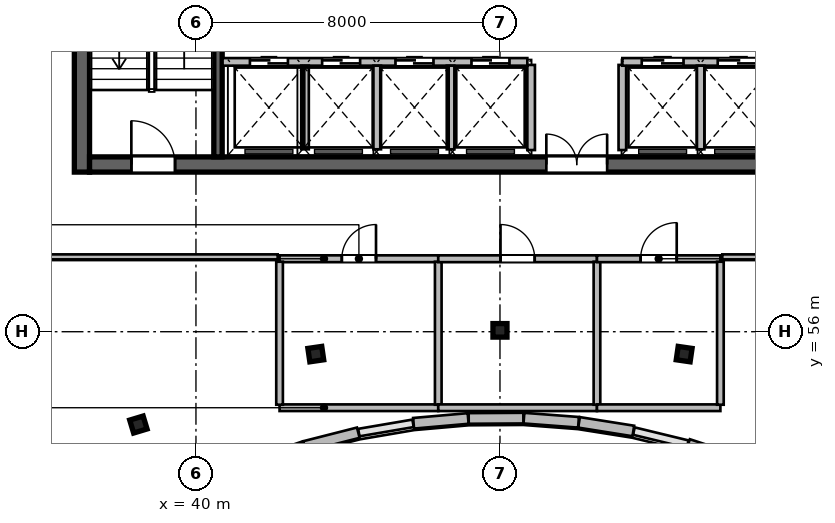
"""IFC4 building model, lengths in metres.
Left out: names, types, materials, properties, quantities, classifications, styles, units other than length and angle.
Written with IfcOpenShell. Run it as: python <this file> out.ifc"""

import sys

from ifc_helpers import new_model, si_unit, direction, frame, frame_2d, origin, origin_2d, place, context, subcontext, project, spatial, rectangle, i_section, extrude, source, transform, mapped, element, fill, save


model = new_model("IFC4")
c1 = context("Model", 3, precision=1e-05, world=origin(), true_north=direction((0.0, 1.0)))
c2 = subcontext(c1, "Body", "Model", "MODEL_VIEW")
j1 = project(units=[si_unit("LENGTHUNIT", "METRE"), si_unit("PLANEANGLEUNIT", "RADIAN")], contexts=[c1])
p1 = place(None, origin())
s1 = spatial("IfcSite", under=j1, at=p1, CompositionType="ELEMENT")
p2 = place(p1, origin())
s2 = spatial("IfcBuilding", under=s1, at=p2, CompositionType="ELEMENT")
p3 = place(p2, frame((0.0, 0.0, 303.0)))
s3 = spatial("IfcBuildingStorey", under=s2, at=p3, CompositionType="ELEMENT", Elevation=303.0)
m1 = source(origin(), c2, "Body", "SweptSolid", [
    extrude(rectangle(XDim=12.0, YDim=0.4, at=frame_2d((6.0, 0.0))), origin(), (0.0, 0.0, 1.0), 4.8),
])
p4 = place(p3, frame((37.0, 60.2, 0.0), z_axis=(0.0, 0.0, 1.0), x_axis=(0.0, 1.0, 0.0)))
e1 = element("IfcWall", 1, at=p4, inside=s3, PredefinedType="SHEAR", context=c2, shape_type="MappedRepresentation", body=[
    mapped(m1, transform((0.0, 0.0, 0.0), scale=1.0)),
])
m2 = source(origin(), c2, "Body", "SweptSolid", [
    extrude(rectangle(XDim=21.6, YDim=0.4, at=frame_2d((10.8, 0.0))), origin(), (0.0, 0.0, 1.0), 4.8),
])
p5 = place(p3, frame((37.2, 60.4, 0.0), z_axis=(0.0, 0.0, 1.0), x_axis=(1.0, 0.0, 0.0)))
e2 = element("IfcWall", 2, at=p5, inside=s3, PredefinedType="SHEAR", context=c2, shape_type="MappedRepresentation", body=[
    mapped(m2, transform((0.0, 0.0, 0.0), scale=1.0)),
])
p6 = place(p5, frame((1.1, 0.0, 0.0)))
e3 = element("IfcOpeningElement", 3, at=p6, cuts=e2, PredefinedType="OPENING", context=c2, shape_type="SweptSolid", body=[
    extrude(rectangle(XDim=1.15, YDim=2.15, at=frame_2d((0.575, 1.075))), frame((0.0, 0.21, 0.0), z_axis=(0.0, -1.0, 0.0), x_axis=(1.0, 0.0, 0.0)), (0.0, 0.0, 1.0), 0.42),
])
p7 = place(p5, frame((19.5, 0.0, 0.0)))
e4 = element("IfcOpeningElement", 4, at=p7, cuts=e2, PredefinedType="OPENING", context=c2, shape_type="SweptSolid", body=[
    extrude(rectangle(XDim=0.9, YDim=2.1, at=frame_2d((0.45, 1.05))), frame((0.0, 0.21, 0.0), z_axis=(0.0, -1.0, 0.0), x_axis=(1.0, 0.0, 0.0)), (0.0, 0.0, 1.0), 0.42),
])
p8 = place(p5, frame((12.02, 0.0, 0.0)))
e5 = element("IfcOpeningElement", 5, at=p8, cuts=e2, PredefinedType="OPENING", context=c2, shape_type="SweptSolid", body=[
    extrude(rectangle(XDim=1.6, YDim=2.15, at=frame_2d((0.8, 1.075))), frame((0.0, 0.21, 0.0), z_axis=(0.0, -1.0, 0.0), x_axis=(1.0, 0.0, 0.0)), (0.0, 0.0, 1.0), 0.42),
])
m3 = source(origin(), c2, "Body", "SweptSolid", [
    extrude(rectangle(XDim=11.2, YDim=0.22, at=frame_2d((5.6, 0.0))), origin(), (0.0, 0.0, 1.0), 4.8),
])
p9 = place(p3, frame((40.58, 60.6, 0.0), z_axis=(0.0, 0.0, 1.0), x_axis=(0.0, 1.0, 0.0)))
e6 = element("IfcWall", 6, at=p9, inside=s3, PredefinedType="SHEAR", context=c2, shape_type="MappedRepresentation", body=[
    mapped(m3, transform((0.0, 0.0, 0.0), scale=1.0)),
])
m4 = source(origin(), c2, "Body", "SweptSolid", [
    extrude(i_section(OverallWidth=0.369, OverallDepth=0.356, WebThickness=0.011, FlangeThickness=0.018, at=origin_2d()), origin(), (0.0, 0.0, 1.0), 4.8),
])
for number, where, z_axis, x_axis in (
    (7, (38.485, 53.558, 0.0), (0.0, 0.0, 1.0), (-0.289, 0.957, 0.0)),
    (8, (43.154, 55.411, 0.0), (0.0, 0.0, 1.0), (-0.143, 0.99, 0.0)),
    (9, (48.0, 56.036, 0.0), (0.0, 0.0, 1.0), (0.0, 1.0, 0.0)),
    (10, (52.846, 55.411, 0.0), (0.0, 0.0, 1.0), (0.143, 0.99, 0.0)),
):
    element("IfcColumn", number, at=place(p3, frame(where, z_axis=z_axis, x_axis=x_axis)), inside=s3, PredefinedType="COLUMN", context=c2, shape_type="MappedRepresentation", body=[
        mapped(m4, transform((0.0, 0.0, 0.0), scale=1.0)),
    ])
m5 = source(origin(), c2, "Body", "SweptSolid", [
    extrude(rectangle(XDim=1.47, YDim=0.28, at=frame_2d((0.735, 0.0))), origin(), (0.0, 0.0, 1.0), 4.54),
])
p10 = place(p3, frame((54.35, 52.58, 0.0), z_axis=(0.0, 0.0, 1.0), x_axis=(-0.950248878954, 0.311491682145, 0.0)))
e11 = element("IfcWall", 11, at=p10, inside=s3, PredefinedType="SOLIDWALL", context=c2, shape_type="MappedRepresentation", body=[
    mapped(m5, transform((0.0, 0.0, 0.0), scale=1.0)),
])
m6 = source(origin(), c2, "Body", "SweptSolid", [
    extrude(rectangle(XDim=1.446, YDim=0.28, at=frame_2d((0.723, 0.0))), origin(), (0.0, 0.0, 1.0), 4.54),
])
p11 = place(p3, frame((51.509, 53.388, 0.0), z_axis=(0.0, 0.0, 1.0), x_axis=(-0.987650460941, 0.156673440642, 0.0)))
e12 = element("IfcWall", 12, at=p11, inside=s3, PredefinedType="SOLIDWALL", context=c2, shape_type="MappedRepresentation", body=[
    mapped(m6, transform((0.0, 0.0, 0.0), scale=1.0)),
])
m7 = source(origin(), c2, "Body", "SweptSolid", [
    extrude(rectangle(XDim=1.44, YDim=0.28, at=frame_2d((0.72, 0.0))), origin(), (0.0, 0.0, 1.0), 4.54),
])
p12 = place(p3, frame((50.066, 53.616, 0.0), z_axis=(0.0, 0.0, 1.0), x_axis=(-0.997124860794, 0.075776064736, 0.0)))
e13 = element("IfcWall", 13, at=p12, inside=s3, PredefinedType="SOLIDWALL", context=c2, shape_type="MappedRepresentation", body=[
    mapped(m7, transform((0.0, 0.0, 0.0), scale=1.0)),
])
m8 = source(origin(), c2, "Body", "SweptSolid", [
    extrude(rectangle(XDim=1.438, YDim=0.28, at=frame_2d((0.719, 0.0))), origin(), (0.0, 0.0, 1.0), 4.54),
])
p13 = place(p3, frame((48.615, 53.726, 0.0), z_axis=(0.0, 0.0, 1.0), x_axis=(-0.999982357135, -0.005940153174, 0.0)))
e14 = element("IfcWall", 14, at=p13, inside=s3, PredefinedType="SOLIDWALL", context=c2, shape_type="MappedRepresentation", body=[
    mapped(m8, transform((0.0, 0.0, 0.0), scale=1.0)),
])
m9 = source(origin(), c2, "Body", "SweptSolid", [
    extrude(rectangle(XDim=1.441, YDim=0.28, at=frame_2d((0.72, 0.0))), origin(), (0.0, 0.0, 1.0), 4.54),
])
p14 = place(p3, frame((47.162, 53.717, 0.0), z_axis=(0.0, 0.0, 1.0), x_axis=(-0.99617032352, -0.087433898101, 0.0)))
e15 = element("IfcWall", 15, at=p14, inside=s3, PredefinedType="SOLIDWALL", context=c2, shape_type="MappedRepresentation", body=[
    mapped(m9, transform((0.0, 0.0, 0.0), scale=1.0)),
])
m10 = source(origin(), c2, "Body", "SweptSolid", [
    extrude(rectangle(XDim=1.458, YDim=0.28, at=frame_2d((0.729, 0.0))), origin(), (0.0, 0.0, 1.0), 4.54),
])
p15 = place(p3, frame((44.271, 53.343, 0.0), z_axis=(0.0, 0.0, 1.0), x_axis=(-0.969109544438, -0.246630677083, 0.0)))
e16 = element("IfcWall", 16, at=p15, inside=s3, PredefinedType="SOLIDWALL", context=c2, shape_type="MappedRepresentation", body=[
    mapped(m10, transform((0.0, 0.0, 0.0), scale=1.0)),
])
m11 = source(origin(), c2, "Body", "SweptSolid", [
    extrude(rectangle(XDim=1.473, YDim=0.28, at=frame_2d((0.736, 0.0))), origin(), (0.0, 0.0, 1.0), 4.54),
])
p16 = place(p3, frame((42.845, 52.979, 0.0), z_axis=(0.0, 0.0, 1.0), x_axis=(-0.946641296917, -0.322289086026, 0.0)))
e17 = element("IfcWall", 17, at=p16, inside=s3, PredefinedType="SOLIDWALL", context=c2, shape_type="MappedRepresentation", body=[
    mapped(m11, transform((0.0, 0.0, 0.0), scale=1.0)),
])
m12 = source(origin(), c2, "Body", "SweptSolid", [
    extrude(rectangle(XDim=2.24, YDim=0.2, at=frame_2d((1.12, 0.0))), origin(), (0.0, 0.0, 1.0), 4.54),
])
for number, where, z_axis, x_axis in (
    (18, (48.82, 60.78, 0.0), (0.0, 0.0, 1.0), (0.0, 1.0, 0.0)),
    (19, (51.22, 60.78, 0.0), (0.0, 0.0, 1.0), (0.0, 1.0, 0.0)),
):
    element("IfcWall", number, at=place(p3, frame(where, z_axis=z_axis, x_axis=x_axis)), inside=s3, PredefinedType="SOLIDWALL", context=c2, shape_type="MappedRepresentation", body=[
        mapped(m12, transform((0.0, 0.0, 0.0), scale=1.0)),
    ])
m13 = source(origin(), c2, "Body", "SweptSolid", [
    extrude(rectangle(XDim=8.02, YDim=0.2, at=frame_2d((4.01, 0.0))), origin(), (0.0, 0.0, 1.0), 4.54),
])
p17 = place(p3, frame((40.7, 63.1, 0.0), z_axis=(0.0, 0.0, 1.0), x_axis=(1.0, 0.0, 0.0)))
e20 = element("IfcWall", 20, at=p17, inside=s3, PredefinedType="SOLIDWALL", context=c2, shape_type="MappedRepresentation", body=[
    mapped(m13, transform((0.0, 0.0, 0.0), scale=1.0)),
])
p18 = place(p17, frame((0.72, 0.0, 0.0)))
e21 = element("IfcOpeningElement", 21, at=p18, cuts=e20, PredefinedType="OPENING", context=c2, shape_type="SweptSolid", body=[
    extrude(rectangle(XDim=1.0, YDim=2.15, at=frame_2d((0.5, 1.075))), frame((0.0, 0.11, 0.0), z_axis=(0.0, -1.0, 0.0), x_axis=(1.0, 0.0, 0.0)), (0.0, 0.0, 1.0), 0.22),
])
p19 = place(p17, frame((2.62, 0.0, 0.0)))
e22 = element("IfcOpeningElement", 22, at=p19, cuts=e20, PredefinedType="OPENING", context=c2, shape_type="SweptSolid", body=[
    extrude(rectangle(XDim=1.0, YDim=2.15, at=frame_2d((0.5, 1.075))), frame((0.0, 0.11, 0.0), z_axis=(0.0, -1.0, 0.0), x_axis=(1.0, 0.0, 0.0)), (0.0, 0.0, 1.0), 0.22),
])
p20 = place(p17, frame((4.55, 0.0, 0.0)))
e23 = element("IfcOpeningElement", 23, at=p20, cuts=e20, PredefinedType="OPENING", context=c2, shape_type="SweptSolid", body=[
    extrude(rectangle(XDim=1.0, YDim=2.15, at=frame_2d((0.5, 1.075))), frame((0.0, 0.11, 0.0), z_axis=(0.0, -1.0, 0.0), x_axis=(1.0, 0.0, 0.0)), (0.0, 0.0, 1.0), 0.22),
])
p21 = place(p17, frame((6.55, 0.0, 0.0)))
e24 = element("IfcOpeningElement", 24, at=p21, cuts=e20, PredefinedType="OPENING", context=c2, shape_type="SweptSolid", body=[
    extrude(rectangle(XDim=1.0, YDim=2.15, at=frame_2d((0.5, 1.075))), frame((0.0, 0.11, 0.0), z_axis=(0.0, -1.0, 0.0), x_axis=(1.0, 0.0, 0.0)), (0.0, 0.0, 1.0), 0.22),
])
m14 = source(origin(), c2, "Body", "SweptSolid", [
    extrude(rectangle(XDim=4.1, YDim=0.2, at=frame_2d((2.05, 0.0))), origin(), (0.0, 0.0, 1.0), 4.54),
])
p22 = place(p3, frame((51.22, 63.1, 0.0), z_axis=(0.0, 0.0, 1.0), x_axis=(1.0, 0.0, 0.0)))
e25 = element("IfcWall", 25, at=p22, inside=s3, PredefinedType="SOLIDWALL", context=c2, shape_type="MappedRepresentation", body=[
    mapped(m14, transform((0.0, 0.0, 0.0), scale=1.0)),
])
p23 = place(p22, frame((0.51, 0.0, 0.0)))
e26 = element("IfcOpeningElement", 26, at=p23, cuts=e25, PredefinedType="OPENING", context=c2, shape_type="SweptSolid", body=[
    extrude(rectangle(XDim=1.1, YDim=2.15, at=frame_2d((0.55, 1.075))), frame((0.0, 0.11, 0.0), z_axis=(0.0, -1.0, 0.0), x_axis=(1.0, 0.0, 0.0)), (0.0, 0.0, 1.0), 0.22),
])
p24 = place(p22, frame((2.51, 0.0, 0.0)))
e27 = element("IfcOpeningElement", 27, at=p24, cuts=e25, PredefinedType="OPENING", context=c2, shape_type="SweptSolid", body=[
    extrude(rectangle(XDim=1.1, YDim=2.15, at=frame_2d((0.55, 1.075))), frame((0.0, 0.11, 0.0), z_axis=(0.0, -1.0, 0.0), x_axis=(1.0, 0.0, 0.0)), (0.0, 0.0, 1.0), 0.22),
])
m15 = source(origin(), c2, "Body", "SweptSolid", [
    extrude(rectangle(XDim=2.2, YDim=0.2, at=frame_2d((1.1, 0.0))), origin(), (0.0, 0.0, 1.0), 4.54),
])
for number, where, z_axis, x_axis in (
    (28, (42.87, 60.8, 0.0), (0.0, 0.0, 1.0), (0.0, 1.0, 0.0)),
    (29, (44.77, 60.8, 0.0), (0.0, 0.0, 1.0), (0.0, 1.0, 0.0)),
    (30, (46.7, 60.8, 0.0), (0.0, 0.0, 1.0), (0.0, 1.0, 0.0)),
    (31, (53.28, 60.8, 0.0), (0.0, 0.0, 1.0), (0.0, 1.0, 0.0)),
):
    element("IfcWall", number, at=place(p3, frame(where, z_axis=z_axis, x_axis=x_axis)), inside=s3, PredefinedType="SOLIDWALL", context=c2, shape_type="MappedRepresentation", body=[
        mapped(m15, transform((0.0, 0.0, 0.0), scale=1.0)),
    ])
m16 = source(origin(), c2, "Body", "SweptSolid", [
    extrude(rectangle(XDim=4.176, YDim=0.175, at=frame_2d((2.088, 0.0))), origin(), (0.0, 0.0, 1.0), 4.54),
])
p25 = place(p3, frame((42.2, 54.0, 0.0), z_axis=(0.0, 0.0, 1.0), x_axis=(1.0, 0.0, 0.0)))
e32 = element("IfcWall", 32, at=p25, inside=s3, PredefinedType="PARTITIONING", context=c2, shape_type="MappedRepresentation", body=[
    mapped(m16, transform((0.0, 0.0, 0.0), scale=1.0)),
])
m17 = source(origin(), c2, "Body", "SweptSolid", [
    extrude(rectangle(XDim=4.176, YDim=0.18, at=frame_2d((2.088, 0.0))), origin(), (0.0, 0.0, 1.0), 4.54),
])
p26 = place(p3, frame((42.2, 57.92, 0.0), z_axis=(0.0, 0.0, 1.0), x_axis=(1.0, 0.0, 0.0)))
e33 = element("IfcWall", 33, at=p26, inside=s3, PredefinedType="PLUMBINGWALL", context=c2, shape_type="MappedRepresentation", body=[
    mapped(m17, transform((0.0, 0.0, 0.0), scale=1.0)),
])
p27 = place(p26, frame((1.638, 0.0, 0.0)))
e34 = element("IfcOpeningElement", 34, at=p27, cuts=e33, PredefinedType="OPENING", context=c2, shape_type="SweptSolid", body=[
    extrude(rectangle(XDim=0.9, YDim=2.08, at=frame_2d((0.45, 1.04))), frame((0.0, 0.1, 0.0), z_axis=(0.0, -1.0, 0.0), x_axis=(1.0, 0.0, 0.0)), (0.0, 0.0, 1.0), 0.2),
])
m18 = source(origin(), c2, "Body", "SweptSolid", [
    extrude(rectangle(XDim=3.763, YDim=0.175, at=frame_2d((1.881, 0.0))), origin(), (0.0, 0.0, 1.0), 4.54),
])
for number, where, z_axis, x_axis in (
    (35, (42.2, 54.079, 0.0), (0.0, 0.0, 1.0), (0.0, 1.0, 0.0)),
    (36, (46.376, 54.079, 0.0), (0.0, 0.0, 1.0), (0.0, 1.0, 0.0)),
):
    element("IfcWall", number, at=place(p3, frame(where, z_axis=z_axis, x_axis=x_axis)), inside=s3, PredefinedType="PARTITIONING", context=c2, shape_type="MappedRepresentation", body=[
        mapped(m18, transform((0.0, 0.0, 0.0), scale=1.0)),
    ])
p28 = place(p3, frame((46.376, 54.0, 0.0), z_axis=(0.0, 0.0, 1.0), x_axis=(1.0, 0.0, 0.0)))
e37 = element("IfcWall", 37, at=p28, inside=s3, PredefinedType="PARTITIONING", context=c2, shape_type="MappedRepresentation", body=[
    mapped(m16, transform((0.0, 0.0, 0.0), scale=1.0)),
])
p29 = place(p3, frame((46.376, 57.92, 0.0), z_axis=(0.0, 0.0, 1.0), x_axis=(1.0, 0.0, 0.0)))
e38 = element("IfcWall", 38, at=p29, inside=s3, PredefinedType="PLUMBINGWALL", context=c2, shape_type="MappedRepresentation", body=[
    mapped(m17, transform((0.0, 0.0, 0.0), scale=1.0)),
])
p30 = place(p29, frame((1.638, 0.0, 0.0)))
e39 = element("IfcOpeningElement", 39, at=p30, cuts=e38, PredefinedType="OPENING", context=c2, shape_type="SweptSolid", body=[
    extrude(rectangle(XDim=0.9, YDim=2.08, at=frame_2d((0.45, 1.04))), frame((0.0, 0.1, 0.0), z_axis=(0.0, -1.0, 0.0), x_axis=(1.0, 0.0, 0.0)), (0.0, 0.0, 1.0), 0.2),
])
p31 = place(p3, frame((50.552, 54.079, 0.0), z_axis=(0.0, 0.0, 1.0), x_axis=(0.0, 1.0, 0.0)))
e40 = element("IfcWall", 40, at=p31, inside=s3, PredefinedType="PARTITIONING", context=c2, shape_type="MappedRepresentation", body=[
    mapped(m18, transform((0.0, 0.0, 0.0), scale=1.0)),
])
m19 = source(origin(), c2, "Body", "SweptSolid", [
    extrude(rectangle(XDim=3.248, YDim=0.175, at=frame_2d((1.624, 0.0))), origin(), (0.0, 0.0, 1.0), 4.54),
])
p32 = place(p3, frame((50.552, 54.0, 0.0), z_axis=(0.0, 0.0, 1.0), x_axis=(1.0, 0.0, 0.0)))
e41 = element("IfcWall", 41, at=p32, inside=s3, PredefinedType="PARTITIONING", context=c2, shape_type="MappedRepresentation", body=[
    mapped(m19, transform((0.0, 0.0, 0.0), scale=1.0)),
])
m20 = source(origin(), c2, "Body", "SweptSolid", [
    extrude(rectangle(XDim=3.248, YDim=0.18, at=frame_2d((1.624, 0.0))), origin(), (0.0, 0.0, 1.0), 4.54),
])
p33 = place(p3, frame((50.552, 57.92, 0.0), z_axis=(0.0, 0.0, 1.0), x_axis=(1.0, 0.0, 0.0)))
e42 = element("IfcWall", 42, at=p33, inside=s3, PredefinedType="PLUMBINGWALL", context=c2, shape_type="MappedRepresentation", body=[
    mapped(m20, transform((0.0, 0.0, 0.0), scale=1.0)),
])
p34 = place(p33, frame((1.149, 0.0, 0.0)))
e43 = element("IfcOpeningElement", 43, at=p34, cuts=e42, PredefinedType="OPENING", context=c2, shape_type="SweptSolid", body=[
    extrude(rectangle(XDim=0.95, YDim=2.12, at=frame_2d((0.475, 1.06))), frame((0.0, 0.1, 0.0), z_axis=(0.0, -1.0, 0.0), x_axis=(1.0, 0.0, 0.0)), (0.0, 0.0, 1.0), 0.2),
])
p35 = place(p3, frame((53.8, 54.079, 0.0), z_axis=(0.0, 0.0, 1.0), x_axis=(0.0, 1.0, 0.0)))
e44 = element("IfcWall", 44, at=p35, inside=s3, PredefinedType="PARTITIONING", context=c2, shape_type="MappedRepresentation", body=[
    mapped(m18, transform((0.0, 0.0, 0.0), scale=1.0)),
])
m21 = source(origin(), c2, "Body", "SweptSolid", [
    extrude(rectangle(XDim=7.79, YDim=0.15, at=frame_2d((3.895, 0.0))), origin(), (0.0, 0.0, 1.0), 3.912),
])
p36 = place(p3, frame((34.36, 57.96, 0.0), z_axis=(0.0, 0.0, 1.0), x_axis=(1.0, 0.0, 0.0)))
e45 = element("IfcWall", 45, at=p36, inside=s3, PredefinedType="PARTITIONING", context=c2, shape_type="MappedRepresentation", body=[
    mapped(m21, transform((0.0, 0.0, 0.0), scale=1.0)),
])
p37 = place(p3, frame((53.85, 57.96, 0.0), z_axis=(0.0, 0.0, 1.0), x_axis=(1.0, 0.0, 0.0)))
e46 = element("IfcWall", 46, at=p37, inside=s3, PredefinedType="PARTITIONING", context=c2, shape_type="MappedRepresentation", body=[
    mapped(m21, transform((0.0, 0.0, 0.0), scale=1.0)),
])
p38 = place(p37, frame((3.195, 0.0, 0.0)))
e47 = element("IfcOpeningElement", 47, at=p38, cuts=e46, PredefinedType="OPENING", context=c2, shape_type="SweptSolid", body=[
    extrude(rectangle(XDim=1.4, YDim=2.15, at=frame_2d((0.7, 1.075))), frame((0.0, 0.085, 0.0), z_axis=(0.0, -1.0, 0.0), x_axis=(1.0, 0.0, 0.0)), (0.0, 0.0, 1.0), 0.17),
])
m22 = source(origin(), c2, "Body", "SweptSolid", [
    extrude(rectangle(XDim=1.15, YDim=2.15, at=frame_2d((0.575, 1.075))), frame((0.0, 0.025, 0.0), z_axis=(0.0, -1.0, 0.0), x_axis=(1.0, 0.0, 0.0)), (0.0, 0.0, 1.0), 0.05),
])
p39 = place(p6, origin())
e48 = element("IfcDoor", 48, at=p39, inside=s3, OperationType="SINGLE_SWING_LEFT", PredefinedType="DOOR", context=c2, shape_type="MappedRepresentation", body=[
    mapped(m22, transform((0.0, 0.0, 0.0), scale=1.0)),
])
fill(e3, e48)
m23 = source(origin(), c2, "Body", "SweptSolid", [
    extrude(rectangle(XDim=1.6, YDim=2.15, at=frame_2d((0.8, 1.075))), frame((0.0, 0.025, 0.0), z_axis=(0.0, -1.0, 0.0), x_axis=(1.0, 0.0, 0.0)), (0.0, 0.0, 1.0), 0.05),
])
p40 = place(p8, origin())
e49 = element("IfcDoor", 49, at=p40, inside=s3, OperationType="DOUBLE_DOOR_SINGLE_SWING", PredefinedType="DOOR", context=c2, shape_type="MappedRepresentation", body=[
    mapped(m23, transform((0.0, 0.0, 0.0), scale=1.0)),
])
fill(e5, e49)
m24 = source(origin(), c2, "Body", "SweptSolid", [
    extrude(rectangle(XDim=1.0, YDim=2.15, at=frame_2d((0.5, 1.075))), frame((0.0, 0.025, 0.0), z_axis=(0.0, -1.0, 0.0), x_axis=(1.0, 0.0, 0.0)), (0.0, 0.0, 1.0), 0.05),
])
p41 = place(p18, origin())
e50 = element("IfcDoor", 50, at=p41, inside=s3, OperationType="DOUBLE_DOOR_SLIDING", PredefinedType="DOOR", context=c2, shape_type="MappedRepresentation", body=[
    mapped(m24, transform((0.0, 0.0, 0.0), scale=1.0)),
])
fill(e21, e50)
p42 = place(p19, origin())
e51 = element("IfcDoor", 51, at=p42, inside=s3, OperationType="DOUBLE_DOOR_SLIDING", PredefinedType="DOOR", context=c2, shape_type="MappedRepresentation", body=[
    mapped(m24, transform((0.0, 0.0, 0.0), scale=1.0)),
])
fill(e22, e51)
p43 = place(p20, origin())
e52 = element("IfcDoor", 52, at=p43, inside=s3, OperationType="DOUBLE_DOOR_SLIDING", PredefinedType="DOOR", context=c2, shape_type="MappedRepresentation", body=[
    mapped(m24, transform((0.0, 0.0, 0.0), scale=1.0)),
])
fill(e23, e52)
p44 = place(p21, origin())
e53 = element("IfcDoor", 53, at=p44, inside=s3, OperationType="DOUBLE_DOOR_SLIDING", PredefinedType="DOOR", context=c2, shape_type="MappedRepresentation", body=[
    mapped(m24, transform((0.0, 0.0, 0.0), scale=1.0)),
])
fill(e24, e53)
m25 = source(origin(), c2, "Body", "SweptSolid", [
    extrude(rectangle(XDim=1.1, YDim=2.15, at=frame_2d((0.55, 1.075))), frame((0.0, 0.025, 0.0), z_axis=(0.0, -1.0, 0.0), x_axis=(1.0, 0.0, 0.0)), (0.0, 0.0, 1.0), 0.05),
])
p45 = place(p23, origin())
e54 = element("IfcDoor", 54, at=p45, inside=s3, OperationType="DOUBLE_DOOR_SLIDING", PredefinedType="DOOR", context=c2, shape_type="MappedRepresentation", body=[
    mapped(m25, transform((0.0, 0.0, 0.0), scale=1.0)),
])
fill(e26, e54)
p46 = place(p24, origin())
e55 = element("IfcDoor", 55, at=p46, inside=s3, OperationType="DOUBLE_DOOR_SLIDING", PredefinedType="DOOR", context=c2, shape_type="MappedRepresentation", body=[
    mapped(m25, transform((0.0, 0.0, 0.0), scale=1.0)),
])
fill(e27, e55)
m26 = source(origin(), c2, "Body", "SweptSolid", [
    extrude(rectangle(XDim=0.9, YDim=2.08, at=frame_2d((0.45, 1.04))), frame((0.0, 0.025, 0.0), z_axis=(0.0, -1.0, 0.0), x_axis=(1.0, 0.0, 0.0)), (0.0, 0.0, 1.0), 0.05),
])
p47 = place(p27, origin())
e56 = element("IfcDoor", 56, at=p47, inside=s3, OperationType="SINGLE_SWING_RIGHT", PredefinedType="DOOR", context=c2, shape_type="MappedRepresentation", body=[
    mapped(m26, transform((0.0, 0.0, 0.0), scale=1.0)),
])
fill(e34, e56)
p48 = place(p30, origin())
e57 = element("IfcDoor", 57, at=p48, inside=s3, OperationType="SINGLE_SWING_LEFT", PredefinedType="DOOR", context=c2, shape_type="MappedRepresentation", body=[
    mapped(m26, transform((0.0, 0.0, 0.0), scale=1.0)),
])
fill(e39, e57)
m27 = source(origin(), c2, "Body", "SweptSolid", [
    extrude(rectangle(XDim=0.95, YDim=2.12, at=frame_2d((0.475, 1.06))), frame((0.0, 0.025, 0.0), z_axis=(0.0, -1.0, 0.0), x_axis=(1.0, 0.0, 0.0)), (0.0, 0.0, 1.0), 0.05),
])
p49 = place(p34, origin())
e58 = element("IfcDoor", 58, at=p49, inside=s3, OperationType="SINGLE_SWING_RIGHT", PredefinedType="DOOR", context=c2, shape_type="MappedRepresentation", body=[
    mapped(m27, transform((0.0, 0.0, 0.0), scale=1.0)),
])
fill(e43, e58)
save(model, sys.argv[1])
